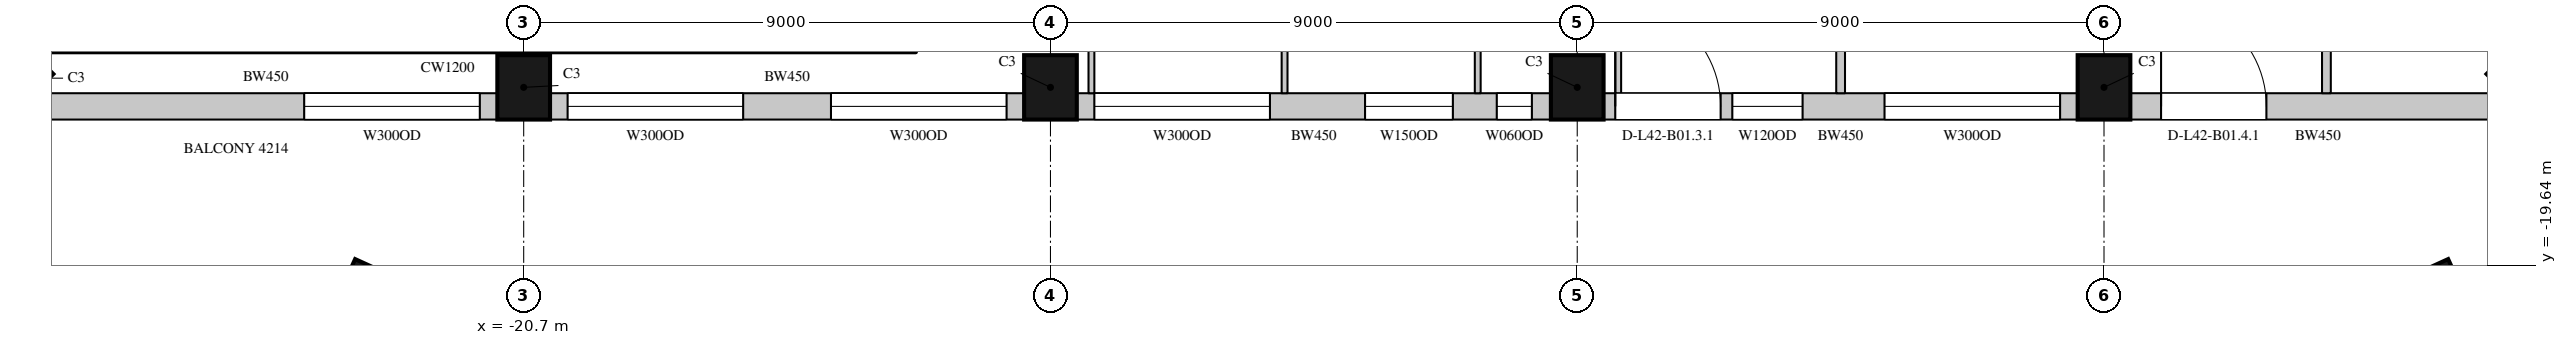
"""IFC4 building model, lengths in metres.
Left out: names, types, materials, properties, quantities, classifications, styles, units other than length and angle.
Written with IfcOpenShell. Run it as: python <this file> out.ifc"""

import sys

from ifc_helpers import new_model, si_unit, direction, frame, frame_2d, origin, origin_2d, place, context, subcontext, project, spatial, rectangle, extrude, element, fill, save


model = new_model("IFC4")
c1 = context("Model", 3, precision=1e-05, world=origin(), true_north=direction((0.0, 1.0)))
c2 = subcontext(c1, "Body", "Model", "MODEL_VIEW")
j1 = project(units=[si_unit("LENGTHUNIT", "METRE"), si_unit("PLANEANGLEUNIT", "RADIAN")], contexts=[c1])
p1 = place(None, origin())
s1 = spatial("IfcSite", under=j1, at=p1, CompositionType="ELEMENT")
p2 = place(p1, origin())
s2 = spatial("IfcBuilding", under=s1, at=p2, CompositionType="ELEMENT")
p3 = place(p2, frame((0.0, 0.0, 193.3)))
s3 = spatial("IfcBuildingStorey", under=s2, at=p3, CompositionType="ELEMENT", Elevation=193.3)
for number, where, z_axis, x_axis in (
    (1, (-29.443, -16.443, 0.0), (0.0, 0.0, 1.0), (0.707, -0.707, 0.0)),
    (2, (-20.7, -16.6, 0.0), (0.0, 0.0, 1.0), (1.0, 0.0, 0.0)),
    (3, (-11.7, -16.6, 0.0), (0.0, 0.0, 1.0), (1.0, 0.0, 0.0)),
    (4, (-2.7, -16.6, 0.0), (0.0, 0.0, 1.0), (1.0, 0.0, 0.0)),
    (5, (6.3, -16.6, 0.0), (0.0, 0.0, 1.0), (1.0, 0.0, 0.0)),
    (6, (13.543, -16.443, 0.0), (0.0, 0.0, 1.0), (0.707, 0.707, 0.0)),
    (7, (-23.398, -20.221, 0.0), (0.0, 0.0, 1.0), (0.91, -0.415, 0.0)),
    (8, (11.998, -20.221, 0.0), (0.0, 0.0, 1.0), (0.91, 0.415, 0.0)),
):
    element("IfcColumn", number, at=place(p3, frame(where, z_axis=z_axis, x_axis=x_axis)), inside=s3, PredefinedType="COLUMN", context=c2, shape_type="SweptSolid", body=[
        extrude(rectangle(XDim=0.9, YDim=1.1, at=origin_2d()), origin(), (0.0, 0.0, 1.0), 4.1),
    ])
p4 = place(p3, frame((-29.064, -16.925, 0.0), z_axis=(0.0, 0.0, 1.0), x_axis=(1.0, 0.0, 0.0)))
e9 = element("IfcWall", 9, at=p4, inside=s3, PredefinedType="SOLIDWALL", context=c2, shape_type="SweptSolid", body=[
    extrude(rectangle(XDim=7.914, YDim=0.45, at=frame_2d((3.957, 0.0))), origin(), (0.0, 0.0, 1.0), 3.8),
])
p5 = place(p4, frame((4.614, 0.0, 1.05)))
e10 = element("IfcOpeningElement", 10, at=p5, cuts=e9, PredefinedType="OPENING", context=c2, shape_type="SweptSolid", body=[
    extrude(rectangle(XDim=3.0, YDim=2.4, at=frame_2d((1.5, 1.2))), frame((0.0, 0.235, 0.0), z_axis=(0.0, -1.0, 0.0), x_axis=(1.0, 0.0, 0.0)), (0.0, 0.0, 1.0), 0.47),
])
p6 = place(p3, frame((-20.25, -16.925, 0.0), z_axis=(0.0, 0.0, 1.0), x_axis=(1.0, 0.0, 0.0)))
e11 = element("IfcWall", 11, at=p6, inside=s3, PredefinedType="SOLIDWALL", context=c2, shape_type="SweptSolid", body=[
    extrude(rectangle(XDim=8.1, YDim=0.45, at=frame_2d((4.05, 0.0))), origin(), (0.0, 0.0, 1.0), 3.8),
])
p7 = place(p6, frame((0.3, 0.0, 1.05)))
e12 = element("IfcOpeningElement", 12, at=p7, cuts=e11, PredefinedType="OPENING", context=c2, shape_type="SweptSolid", body=[
    extrude(rectangle(XDim=3.0, YDim=2.4, at=frame_2d((1.5, 1.2))), frame((0.0, 0.235, 0.0), z_axis=(0.0, -1.0, 0.0), x_axis=(1.0, 0.0, 0.0)), (0.0, 0.0, 1.0), 0.47),
])
p8 = place(p6, frame((4.8, 0.0, 1.05)))
e13 = element("IfcOpeningElement", 13, at=p8, cuts=e11, PredefinedType="OPENING", context=c2, shape_type="SweptSolid", body=[
    extrude(rectangle(XDim=3.0, YDim=2.4, at=frame_2d((1.5, 1.2))), frame((0.0, 0.235, 0.0), z_axis=(0.0, -1.0, 0.0), x_axis=(1.0, 0.0, 0.0)), (0.0, 0.0, 1.0), 0.47),
])
p9 = place(p3, frame((-11.25, -16.925, 0.0), z_axis=(0.0, 0.0, 1.0), x_axis=(1.0, 0.0, 0.0)))
e14 = element("IfcWall", 14, at=p9, inside=s3, PredefinedType="SOLIDWALL", context=c2, shape_type="SweptSolid", body=[
    extrude(rectangle(XDim=8.1, YDim=0.45, at=frame_2d((4.05, 0.0))), origin(), (0.0, 0.0, 1.0), 3.8),
])
p10 = place(p9, frame((0.3, 0.0, 1.05)))
e15 = element("IfcOpeningElement", 15, at=p10, cuts=e14, PredefinedType="OPENING", context=c2, shape_type="SweptSolid", body=[
    extrude(rectangle(XDim=3.0, YDim=2.4, at=frame_2d((1.5, 1.2))), frame((0.0, 0.235, 0.0), z_axis=(0.0, -1.0, 0.0), x_axis=(1.0, 0.0, 0.0)), (0.0, 0.0, 1.0), 0.47),
])
p11 = place(p9, frame((4.925, 0.0, 1.05)))
e16 = element("IfcOpeningElement", 16, at=p11, cuts=e14, PredefinedType="OPENING", context=c2, shape_type="SweptSolid", body=[
    extrude(rectangle(XDim=1.5, YDim=2.4, at=frame_2d((0.75, 1.2))), frame((0.0, 0.235, 0.0), z_axis=(0.0, -1.0, 0.0), x_axis=(1.0, 0.0, 0.0)), (0.0, 0.0, 1.0), 0.47),
])
p12 = place(p9, frame((7.175, 0.0, 1.05)))
e17 = element("IfcOpeningElement", 17, at=p12, cuts=e14, PredefinedType="OPENING", context=c2, shape_type="SweptSolid", body=[
    extrude(rectangle(XDim=0.6, YDim=2.4, at=frame_2d((0.3, 1.2))), frame((0.0, 0.235, 0.0), z_axis=(0.0, -1.0, 0.0), x_axis=(1.0, 0.0, 0.0)), (0.0, 0.0, 1.0), 0.47),
])
p13 = place(p3, frame((-2.25, -16.925, 0.0), z_axis=(0.0, 0.0, 1.0), x_axis=(1.0, 0.0, 0.0)))
e18 = element("IfcWall", 18, at=p13, inside=s3, PredefinedType="SOLIDWALL", context=c2, shape_type="SweptSolid", body=[
    extrude(rectangle(XDim=8.1, YDim=0.45, at=frame_2d((4.05, 0.0))), origin(), (0.0, 0.0, 1.0), 3.8),
])
p14 = place(p13, frame((0.2, 0.0, 0.0)))
e19 = element("IfcOpeningElement", 19, at=p14, cuts=e18, PredefinedType="OPENING", context=c2, shape_type="SweptSolid", body=[
    extrude(rectangle(XDim=1.8, YDim=2.4, at=frame_2d((0.9, 1.2))), frame((0.0, 0.235, 0.0), z_axis=(0.0, -1.0, 0.0), x_axis=(1.0, 0.0, 0.0)), (0.0, 0.0, 1.0), 0.47),
])
p15 = place(p13, frame((2.2, 0.0, 1.05)))
e20 = element("IfcOpeningElement", 20, at=p15, cuts=e18, PredefinedType="OPENING", context=c2, shape_type="SweptSolid", body=[
    extrude(rectangle(XDim=1.2, YDim=2.4, at=frame_2d((0.6, 1.2))), frame((0.0, 0.235, 0.0), z_axis=(0.0, -1.0, 0.0), x_axis=(1.0, 0.0, 0.0)), (0.0, 0.0, 1.0), 0.47),
])
p16 = place(p13, frame((4.8, 0.0, 1.05)))
e21 = element("IfcOpeningElement", 21, at=p16, cuts=e18, PredefinedType="OPENING", context=c2, shape_type="SweptSolid", body=[
    extrude(rectangle(XDim=3.0, YDim=2.4, at=frame_2d((1.5, 1.2))), frame((0.0, 0.235, 0.0), z_axis=(0.0, -1.0, 0.0), x_axis=(1.0, 0.0, 0.0)), (0.0, 0.0, 1.0), 0.47),
])
p17 = place(p3, frame((6.75, -16.925, 0.0), z_axis=(0.0, 0.0, 1.0), x_axis=(1.0, 0.0, 0.0)))
e22 = element("IfcWall", 22, at=p17, inside=s3, PredefinedType="SOLIDWALL", context=c2, shape_type="SweptSolid", body=[
    extrude(rectangle(XDim=6.414, YDim=0.45, at=frame_2d((3.207, 0.0))), origin(), (0.0, 0.0, 1.0), 3.8),
])
p18 = place(p17, frame((0.525, 0.0, 0.0)))
e23 = element("IfcOpeningElement", 23, at=p18, cuts=e22, PredefinedType="OPENING", context=c2, shape_type="SweptSolid", body=[
    extrude(rectangle(XDim=1.8, YDim=2.4, at=frame_2d((0.9, 1.2))), frame((0.0, 0.235, 0.0), z_axis=(0.0, -1.0, 0.0), x_axis=(1.0, 0.0, 0.0)), (0.0, 0.0, 1.0), 0.47),
])
p19 = place(p3, frame((1.8, -16.7, 0.0), z_axis=(0.0, 0.0, 1.0), x_axis=(0.0, 1.0, 0.0)))
e24 = element("IfcWall", 24, at=p19, inside=s3, PredefinedType="PARTITIONING", context=c2, shape_type="SweptSolid", body=[
    extrude(rectangle(XDim=5.5, YDim=0.15, at=frame_2d((2.75, 0.0))), origin(), (0.0, 0.0, 1.0), 3.15),
])
p20 = place(p3, frame((10.1, -16.7, 0.0), z_axis=(0.0, 0.0, 1.0), x_axis=(0.0, 1.0, 0.0)))
e25 = element("IfcWall", 25, at=p20, inside=s3, PredefinedType="PARTITIONING", context=c2, shape_type="SweptSolid", body=[
    extrude(rectangle(XDim=5.6, YDim=0.15, at=frame_2d((2.8, 0.0))), origin(), (0.0, 0.0, 1.0), 3.8),
])
p21 = place(p3, frame((-11.0, -16.7, 0.0), z_axis=(0.0, 0.0, 1.0), x_axis=(0.0, 1.0, 0.0)))
e26 = element("IfcWall", 26, at=p21, inside=s3, PredefinedType="PARTITIONING", context=c2, shape_type="SweptSolid", body=[
    extrude(rectangle(XDim=1.88, YDim=0.1, at=frame_2d((0.94, 0.0))), origin(), (0.0, 0.0, 1.0), 3.8),
])
for number, where, z_axis, x_axis in (
    (27, (-7.7, -16.7, 0.0), (0.0, 0.0, 1.0), (0.0, 1.0, 0.0)),
    (28, (-4.4, -16.7, 0.0), (0.0, 0.0, 1.0), (0.0, 1.0, 0.0)),
    (29, (-2.0, -16.7, 0.0), (0.0, 0.0, 1.0), (0.0, 1.0, 0.0)),
):
    element("IfcWall", number, at=place(p3, frame(where, z_axis=z_axis, x_axis=x_axis)), inside=s3, PredefinedType="PARTITIONING", context=c2, shape_type="SweptSolid", body=[
        extrude(rectangle(XDim=5.5, YDim=0.1, at=frame_2d((2.75, 0.0))), origin(), (0.0, 0.0, 1.0), 3.8),
    ])
p22 = place(p5, origin())
e30 = element("IfcWindow", 30, at=p22, inside=s3, PartitioningType="SINGLE_PANEL", PredefinedType="WINDOW", context=c2, shape_type="SweptSolid", body=[
    extrude(rectangle(XDim=3.0, YDim=2.4, at=frame_2d((1.5, 1.2))), frame((0.0, 0.135, 0.0), z_axis=(0.0, -1.0, 0.0), x_axis=(1.0, 0.0, 0.0)), (0.0, 0.0, 1.0), 0.06),
])
fill(e10, e30)
p23 = place(p7, origin())
e31 = element("IfcWindow", 31, at=p23, inside=s3, PartitioningType="SINGLE_PANEL", PredefinedType="WINDOW", context=c2, shape_type="SweptSolid", body=[
    extrude(rectangle(XDim=3.0, YDim=2.4, at=frame_2d((1.5, 1.2))), frame((0.0, 0.135, 0.0), z_axis=(0.0, -1.0, 0.0), x_axis=(1.0, 0.0, 0.0)), (0.0, 0.0, 1.0), 0.06),
])
fill(e12, e31)
p24 = place(p8, origin())
e32 = element("IfcWindow", 32, at=p24, inside=s3, PartitioningType="SINGLE_PANEL", PredefinedType="WINDOW", context=c2, shape_type="SweptSolid", body=[
    extrude(rectangle(XDim=3.0, YDim=2.4, at=frame_2d((1.5, 1.2))), frame((0.0, 0.135, 0.0), z_axis=(0.0, -1.0, 0.0), x_axis=(1.0, 0.0, 0.0)), (0.0, 0.0, 1.0), 0.06),
])
fill(e13, e32)
p25 = place(p10, origin())
e33 = element("IfcWindow", 33, at=p25, inside=s3, PartitioningType="SINGLE_PANEL", PredefinedType="WINDOW", context=c2, shape_type="SweptSolid", body=[
    extrude(rectangle(XDim=3.0, YDim=2.4, at=frame_2d((1.5, 1.2))), frame((0.0, 0.135, 0.0), z_axis=(0.0, -1.0, 0.0), x_axis=(1.0, 0.0, 0.0)), (0.0, 0.0, 1.0), 0.06),
])
fill(e15, e33)
p26 = place(p14, origin())
e34 = element("IfcDoor", 34, at=p26, inside=s3, OperationType="SLIDING_TO_LEFT", PredefinedType="DOOR", context=c2, shape_type="SweptSolid", body=[
    extrude(rectangle(XDim=1.8, YDim=2.4, at=frame_2d((0.9, 1.2))), frame((0.0, 0.13, 0.0), z_axis=(0.0, -1.0, 0.0), x_axis=(1.0, 0.0, 0.0)), (0.0, 0.0, 1.0), 0.05),
])
fill(e19, e34)
p27 = place(p15, origin())
e35 = element("IfcWindow", 35, at=p27, inside=s3, PartitioningType="SINGLE_PANEL", PredefinedType="WINDOW", context=c2, shape_type="SweptSolid", body=[
    extrude(rectangle(XDim=1.2, YDim=2.4, at=frame_2d((0.6, 1.2))), frame((0.0, 0.135, 0.0), z_axis=(0.0, -1.0, 0.0), x_axis=(1.0, 0.0, 0.0)), (0.0, 0.0, 1.0), 0.06),
])
fill(e20, e35)
p28 = place(p16, origin())
e36 = element("IfcWindow", 36, at=p28, inside=s3, PartitioningType="SINGLE_PANEL", PredefinedType="WINDOW", context=c2, shape_type="SweptSolid", body=[
    extrude(rectangle(XDim=3.0, YDim=2.4, at=frame_2d((1.5, 1.2))), frame((0.0, 0.135, 0.0), z_axis=(0.0, -1.0, 0.0), x_axis=(1.0, 0.0, 0.0)), (0.0, 0.0, 1.0), 0.06),
])
fill(e21, e36)
p29 = place(p18, origin())
e37 = element("IfcDoor", 37, at=p29, inside=s3, OperationType="SLIDING_TO_LEFT", PredefinedType="DOOR", context=c2, shape_type="SweptSolid", body=[
    extrude(rectangle(XDim=1.8, YDim=2.4, at=frame_2d((0.9, 1.2))), frame((0.0, 0.13, 0.0), z_axis=(0.0, -1.0, 0.0), x_axis=(1.0, 0.0, 0.0)), (0.0, 0.0, 1.0), 0.05),
])
fill(e23, e37)
p30 = place(p11, origin())
e38 = element("IfcWindow", 38, at=p30, inside=s3, PartitioningType="SINGLE_PANEL", PredefinedType="WINDOW", context=c2, shape_type="SweptSolid", body=[
    extrude(rectangle(XDim=1.5, YDim=2.4, at=frame_2d((0.75, 1.2))), frame((0.0, 0.135, 0.0), z_axis=(0.0, -1.0, 0.0), x_axis=(1.0, 0.0, 0.0)), (0.0, 0.0, 1.0), 0.06),
])
fill(e16, e38)
p31 = place(p12, origin())
e39 = element("IfcWindow", 39, at=p31, inside=s3, PartitioningType="SINGLE_PANEL", PredefinedType="WINDOW", context=c2, shape_type="SweptSolid", body=[
    extrude(rectangle(XDim=0.6, YDim=2.4, at=frame_2d((0.3, 1.2))), frame((0.0, 0.135, 0.0), z_axis=(0.0, -1.0, 0.0), x_axis=(1.0, 0.0, 0.0)), (0.0, 0.0, 1.0), 0.06),
])
fill(e17, e39)
save(model, sys.argv[1])
